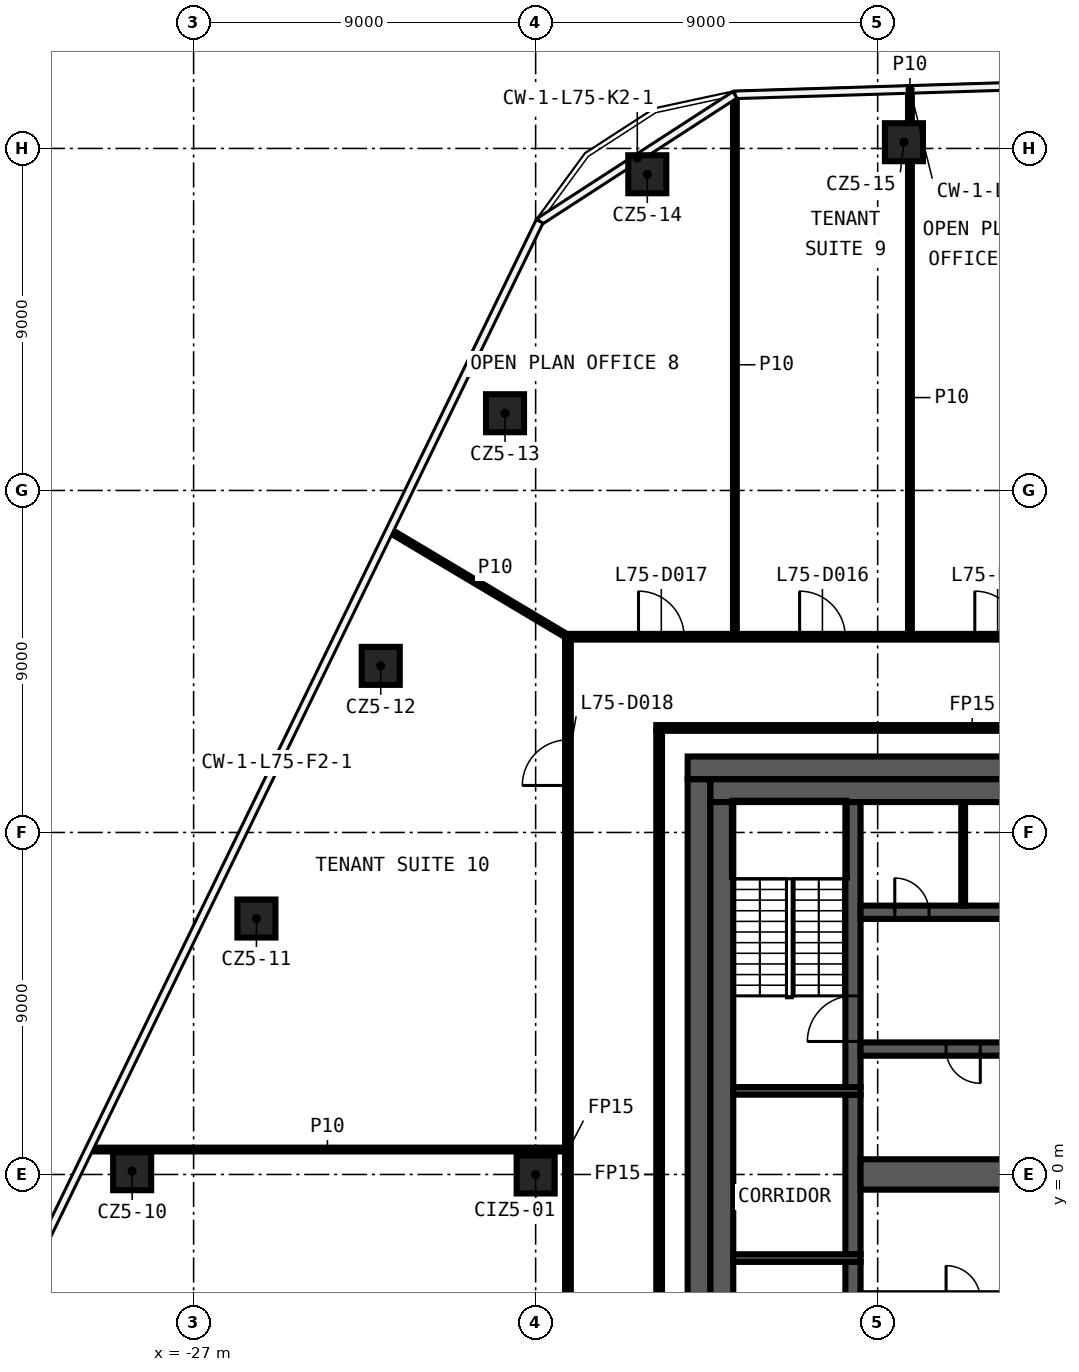
"""IFC4 building model, lengths in metres.
Left out: names, types, materials, properties, quantities, classifications, styles, units other than length and angle.
Written with IfcOpenShell. Run it as: python <this file> out.ifc"""

import sys

from ifc_helpers import new_model, si_unit, direction, frame, frame_2d, origin, origin_2d, place, context, subcontext, project, spatial, rectangle, extrude, element, fill, save


model = new_model("IFC4")
c1 = context("Model", 3, precision=1e-05, world=origin(), true_north=direction((0.0, 1.0)))
c2 = subcontext(c1, "Body", "Model", "MODEL_VIEW")
j1 = project(units=[si_unit("LENGTHUNIT", "METRE"), si_unit("PLANEANGLEUNIT", "RADIAN")], contexts=[c1])
p1 = place(None, origin())
s1 = spatial("IfcSite", under=j1, at=p1, CompositionType="ELEMENT")
p2 = place(p1, origin())
s2 = spatial("IfcBuilding", under=s1, at=p2, CompositionType="ELEMENT")
p3 = place(p2, frame((0.0, 0.0, 348.8)))
s3 = spatial("IfcBuildingStorey", under=s2, at=p3, CompositionType="ELEMENT", Elevation=348.8)
for number, where, z_axis, x_axis in (
    (1, (-28.617, 0.086, 0.0), (0.0, 0.0, 1.0), (1.0, 0.0, 0.0)),
    (2, (-25.347, 6.735, 0.0), (0.0, 0.0, 1.0), (1.0, 0.0, 0.0)),
    (3, (-22.076, 13.384, 0.0), (0.0, 0.0, 1.0), (1.0, 0.0, 0.0)),
    (4, (-18.806, 20.032, 0.0), (0.0, 0.0, 1.0), (1.0, 0.0, 0.0)),
    (5, (-15.062, 26.321, 0.0), (0.0, 0.0, 1.0), (1.0, 0.0, 0.0)),
    (6, (-8.309, 27.164, 0.0), (0.0, 0.0, 1.0), (1.0, 0.0, 0.0)),
    (7, (-18.0, 0.0, 0.0), (0.0, 0.0, 1.0), (1.0, 0.0, 0.0)),
):
    element("IfcColumn", number, at=place(p3, frame(where, z_axis=z_axis, x_axis=x_axis)), inside=s3, PredefinedType="COLUMN", context=c2, shape_type="SweptSolid", body=[
        extrude(rectangle(XDim=1.0, YDim=1.0, at=origin_2d()), origin(), (0.0, 0.0, 1.0), 3.7),
    ])
p4 = place(p3, frame((-29.732, 0.656, 0.0), z_axis=(0.0, 0.0, 1.0), x_axis=(1.0, 0.0, 0.0)))
e8 = element("IfcWall", 8, at=p4, inside=s3, PredefinedType="PARTITIONING", context=c2, shape_type="SweptSolid", body=[
    extrude(rectangle(XDim=12.507, YDim=0.1, at=frame_2d((6.253, 0.0))), origin(), (0.0, 0.0, 1.0), 3.7),
])
p5 = place(p3, frame((-14.825, 11.75, 0.0), z_axis=(0.0, 0.0, 1.0), x_axis=(1.0, 0.0, 0.0)))
e9 = element("IfcWall", 9, at=p5, inside=s3, PredefinedType="PARTITIONING", context=c2, shape_type="SweptSolid", body=[
    extrude(rectangle(XDim=16.625, YDim=0.15, at=frame_2d((8.312, 0.0))), origin(), (0.0, 0.0, 1.0), 3.7),
])
p6 = place(p3, frame((-17.225, 14.15, 0.0), z_axis=(0.0, 0.0, 1.0), x_axis=(1.0, 0.0, 0.0)))
e10 = element("IfcWall", 10, at=p6, inside=s3, PredefinedType="PARTITIONING", context=c2, shape_type="SweptSolid", body=[
    extrude(rectangle(XDim=34.45, YDim=0.15, at=frame_2d((17.225, 0.0))), origin(), (0.0, 0.0, 1.0), 3.7),
])
p7 = place(p6, frame((31.19, 0.0, 0.0)))
e11 = element("IfcOpeningElement", 11, at=p7, cuts=e10, PredefinedType="OPENING", context=c2, shape_type="SweptSolid", body=[
    extrude(rectangle(XDim=1.2, YDim=2.1, at=frame_2d((0.6, 1.05))), frame((0.0, 0.085, 0.0), z_axis=(0.0, -1.0, 0.0), x_axis=(1.0, 0.0, 0.0)), (0.0, 0.0, 1.0), 0.17),
])
p8 = place(p6, frame((24.621, 0.0, 0.0)))
e12 = element("IfcOpeningElement", 12, at=p8, cuts=e10, PredefinedType="OPENING", context=c2, shape_type="SweptSolid", body=[
    extrude(rectangle(XDim=1.2, YDim=2.1, at=frame_2d((0.6, 1.05))), frame((0.0, 0.085, 0.0), z_axis=(0.0, -1.0, 0.0), x_axis=(1.0, 0.0, 0.0)), (0.0, 0.0, 1.0), 0.17),
])
p9 = place(p6, frame((17.703, 0.0, 0.0)))
e13 = element("IfcOpeningElement", 13, at=p9, cuts=e10, PredefinedType="OPENING", context=c2, shape_type="SweptSolid", body=[
    extrude(rectangle(XDim=1.2, YDim=2.1, at=frame_2d((0.6, 1.05))), frame((0.0, 0.085, 0.0), z_axis=(0.0, -1.0, 0.0), x_axis=(1.0, 0.0, 0.0)), (0.0, 0.0, 1.0), 0.17),
])
p10 = place(p6, frame((10.781, 0.0, 0.0)))
e14 = element("IfcOpeningElement", 14, at=p10, cuts=e10, PredefinedType="OPENING", context=c2, shape_type="SweptSolid", body=[
    extrude(rectangle(XDim=1.2, YDim=2.1, at=frame_2d((0.6, 1.05))), frame((0.0, 0.085, 0.0), z_axis=(0.0, -1.0, 0.0), x_axis=(1.0, 0.0, 0.0)), (0.0, 0.0, 1.0), 0.17),
])
p11 = place(p6, frame((6.171, 0.0, 0.0)))
e15 = element("IfcOpeningElement", 15, at=p11, cuts=e10, PredefinedType="OPENING", context=c2, shape_type="SweptSolid", body=[
    extrude(rectangle(XDim=1.2, YDim=2.1, at=frame_2d((0.6, 1.05))), frame((0.0, 0.085, 0.0), z_axis=(0.0, -1.0, 0.0), x_axis=(1.0, 0.0, 0.0)), (0.0, 0.0, 1.0), 0.17),
])
p12 = place(p6, frame((1.932, 0.0, 0.0)))
e16 = element("IfcOpeningElement", 16, at=p12, cuts=e10, PredefinedType="OPENING", context=c2, shape_type="SweptSolid", body=[
    extrude(rectangle(XDim=1.2, YDim=2.1, at=frame_2d((0.6, 1.05))), frame((0.0, 0.085, 0.0), z_axis=(0.0, -1.0, 0.0), x_axis=(1.0, 0.0, 0.0)), (0.0, 0.0, 1.0), 0.17),
])
p13 = place(p3, frame((-8.151, 14.225, 0.0), z_axis=(0.0, 0.0, 1.0), x_axis=(0.0, 1.0, 0.0)))
e17 = element("IfcWall", 17, at=p13, inside=s3, PredefinedType="PARTITIONING", context=c2, shape_type="SweptSolid", body=[
    extrude(rectangle(XDim=12.439, YDim=0.1, at=frame_2d((6.219, 0.0))), origin(), (0.0, 0.0, 1.0), 3.7),
])
p14 = place(p3, frame((-8.151, 27.664, 0.0), z_axis=(0.0, 0.0, 1.0), x_axis=(0.0, 1.0, 0.0)))
e18 = element("IfcWall", 18, at=p14, inside=s3, PredefinedType="PARTITIONING", context=c2, shape_type="SweptSolid", body=[
    extrude(rectangle(XDim=0.869, YDim=0.1, at=frame_2d((0.435, 0.0))), origin(), (0.0, 0.0, 1.0), 3.7),
])
p15 = place(p3, frame((-12.757, 14.225, 0.0), z_axis=(0.0, 0.0, 1.0), x_axis=(0.0, 1.0, 0.0)))
e19 = element("IfcWall", 19, at=p15, inside=s3, PredefinedType="PARTITIONING", context=c2, shape_type="SweptSolid", body=[
    extrude(rectangle(XDim=14.165, YDim=0.1, at=frame_2d((7.083, 0.0))), origin(), (0.0, 0.0, 1.0), 3.7),
])
p16 = place(p3, frame((-14.75, -11.675, 0.0), z_axis=(0.0, 0.0, 1.0), x_axis=(0.0, 1.0, 0.0)))
e20 = element("IfcWall", 20, at=p16, inside=s3, PredefinedType="PARTITIONING", context=c2, shape_type="SweptSolid", body=[
    extrude(rectangle(XDim=23.35, YDim=0.15, at=frame_2d((11.675, 0.0))), origin(), (0.0, 0.0, 1.0), 3.7),
])
p17 = place(p3, frame((-17.15, -14.075, 0.0), z_axis=(0.0, 0.0, 1.0), x_axis=(0.0, 1.0, 0.0)))
e21 = element("IfcWall", 21, at=p17, inside=s3, PredefinedType="PARTITIONING", context=c2, shape_type="SweptSolid", body=[
    extrude(rectangle(XDim=28.15, YDim=0.15, at=frame_2d((14.075, 0.0))), origin(), (0.0, 0.0, 1.0), 3.7),
])
p18 = place(p17, frame((3.891, 0.0, 0.0)))
e22 = element("IfcOpeningElement", 22, at=p18, cuts=e21, PredefinedType="OPENING", context=c2, shape_type="SweptSolid", body=[
    extrude(rectangle(XDim=1.2, YDim=2.1, at=frame_2d((0.6, 1.05))), frame((0.0, 0.085, 0.0), z_axis=(0.0, -1.0, 0.0), x_axis=(1.0, 0.0, 0.0)), (0.0, 0.0, 1.0), 0.17),
])
p19 = place(p17, frame((24.312, 0.0, 0.0)))
e23 = element("IfcOpeningElement", 23, at=p19, cuts=e21, PredefinedType="OPENING", context=c2, shape_type="SweptSolid", body=[
    extrude(rectangle(XDim=1.2, YDim=2.1, at=frame_2d((0.6, 1.05))), frame((0.0, 0.085, 0.0), z_axis=(0.0, -1.0, 0.0), x_axis=(1.0, 0.0, 0.0)), (0.0, 0.0, 1.0), 0.17),
])
p20 = place(p3, frame((-21.828, 16.935, 0.0), z_axis=(0.0, 0.0, 1.0), x_axis=(0.859229054867, -0.51159107818, 0.0)))
e24 = element("IfcWall", 24, at=p20, inside=s3, PredefinedType="PARTITIONING", context=c2, shape_type="SweptSolid", body=[
    extrude(rectangle(XDim=5.444, YDim=0.1, at=frame_2d((2.722, 0.0))), origin(), (0.0, 0.0, 1.0), 3.7),
])
p21 = place(p3, frame((-14.0, 10.7, 0.0), z_axis=(0.0, 0.0, 1.0), x_axis=(1.0, 0.0, 0.0)))
e25 = element("IfcWall", 25, at=p21, inside=s3, PredefinedType="SHEAR", context=c2, shape_type="SweptSolid", body=[
    extrude(rectangle(XDim=28.0, YDim=0.6, at=frame_2d((14.0, 0.0))), origin(), (0.0, 0.0, 1.0), 3.7),
])
p22 = place(p21, frame((15.9, 0.0, 0.0)))
e26 = element("IfcOpeningElement", 26, at=p22, cuts=e25, PredefinedType="OPENING", context=c2, shape_type="SweptSolid", body=[
    extrude(rectangle(XDim=1.6, YDim=2.1, at=frame_2d((0.8, 1.05))), frame((0.0, 0.31, 0.0), z_axis=(0.0, -1.0, 0.0), x_axis=(1.0, 0.0, 0.0)), (0.0, 0.0, 1.0), 0.62),
])
p23 = place(p3, frame((-13.7, -10.4, 0.0), z_axis=(0.0, 0.0, 1.0), x_axis=(0.0, 1.0, 0.0)))
e27 = element("IfcWall", 27, at=p23, inside=s3, PredefinedType="SHEAR", context=c2, shape_type="SweptSolid", body=[
    extrude(rectangle(XDim=20.8, YDim=0.6, at=frame_2d((10.4, 0.0))), origin(), (0.0, 0.0, 1.0), 3.7),
])
p24 = place(p3, frame((-13.4, 10.1, 0.0), z_axis=(0.0, 0.0, 1.0), x_axis=(1.0, 0.0, 0.0)))
e28 = element("IfcWall", 28, at=p24, inside=s3, PredefinedType="SHEAR", context=c2, shape_type="SweptSolid", body=[
    extrude(rectangle(XDim=14.9, YDim=0.6, at=frame_2d((7.45, 0.0))), origin(), (0.0, 0.0, 1.0), 3.7),
])
p25 = place(p3, frame((-13.1, -9.8, 0.0), z_axis=(0.0, 0.0, 1.0), x_axis=(0.0, 1.0, 0.0)))
e29 = element("IfcWall", 29, at=p25, inside=s3, PredefinedType="SHEAR", context=c2, shape_type="SweptSolid", body=[
    extrude(rectangle(XDim=19.6, YDim=0.6, at=frame_2d((9.8, 0.0))), origin(), (0.0, 0.0, 1.0), 3.7),
])
p26 = place(p3, frame((-9.65, -9.8, 0.0), z_axis=(0.0, 0.0, 1.0), x_axis=(0.0, 1.0, 0.0)))
e30 = element("IfcWall", 30, at=p26, inside=s3, PredefinedType="SHEAR", context=c2, shape_type="SweptSolid", body=[
    extrude(rectangle(XDim=7.5, YDim=0.4, at=frame_2d((3.75, 0.0))), origin(), (0.0, 0.0, 1.0), 3.7),
])
p27 = place(p26, frame((5.1, 0.0, 0.0)))
e31 = element("IfcOpeningElement", 31, at=p27, cuts=e30, PredefinedType="OPENING", context=c2, shape_type="SweptSolid", body=[
    extrude(rectangle(XDim=1.2, YDim=2.1, at=frame_2d((0.6, 1.05))), frame((0.0, 0.21, 0.0), z_axis=(0.0, -1.0, 0.0), x_axis=(1.0, 0.0, 0.0)), (0.0, 0.0, 1.0), 0.42),
])
p28 = place(p3, frame((-9.65, -2.1, 0.0), z_axis=(0.0, 0.0, 1.0), x_axis=(0.0, 1.0, 0.0)))
e32 = element("IfcWall", 32, at=p28, inside=s3, PredefinedType="SHEAR", context=c2, shape_type="SweptSolid", body=[
    extrude(rectangle(XDim=4.2, YDim=0.4, at=frame_2d((2.1, 0.0))), origin(), (0.0, 0.0, 1.0), 3.7),
])
p29 = place(p3, frame((-9.65, 2.3, 0.0), z_axis=(0.0, 0.0, 1.0), x_axis=(0.0, 1.0, 0.0)))
e33 = element("IfcWall", 33, at=p29, inside=s3, PredefinedType="SHEAR", context=c2, shape_type="SweptSolid", body=[
    extrude(rectangle(XDim=7.5, YDim=0.4, at=frame_2d((3.75, 0.0))), origin(), (0.0, 0.0, 1.0), 3.7),
])
p30 = place(p29, frame((1.2, 0.0, 0.0)))
e34 = element("IfcOpeningElement", 34, at=p30, cuts=e33, PredefinedType="OPENING", context=c2, shape_type="SweptSolid", body=[
    extrude(rectangle(XDim=1.2, YDim=2.1, at=frame_2d((0.6, 1.05))), frame((0.0, 0.21, 0.0), z_axis=(0.0, -1.0, 0.0), x_axis=(1.0, 0.0, 0.0)), (0.0, 0.0, 1.0), 0.42),
])
for number, where, z_axis, x_axis in (
    (35, (-9.45, 2.2, 0.0), (0.0, 0.0, 1.0), (-1.0, 0.0, 0.0)),
    (36, (-9.45, -2.2, 0.0), (0.0, 0.0, 1.0), (-1.0, 0.0, 0.0)),
):
    element("IfcWall", number, at=place(p3, frame(where, z_axis=z_axis, x_axis=x_axis)), inside=s3, PredefinedType="SHEAR", context=c2, shape_type="SweptSolid", body=[
        extrude(rectangle(XDim=3.35, YDim=0.2, at=frame_2d((1.675, 0.0))), origin(), (0.0, 0.0, 1.0), 3.7),
    ])
p31 = place(p3, frame((-9.45, 6.9, 0.0), z_axis=(0.0, 0.0, 1.0), x_axis=(1.0, 0.0, 0.0)))
e37 = element("IfcWall", 37, at=p31, inside=s3, PredefinedType="SHEAR", context=c2, shape_type="SweptSolid", body=[
    extrude(rectangle(XDim=18.9, YDim=0.35, at=frame_2d((9.45, 0.0))), origin(), (0.0, 0.0, 1.0), 3.7),
])
p32 = place(p31, frame((11.55, 0.0, 0.0)))
e38 = element("IfcOpeningElement", 38, at=p32, cuts=e37, PredefinedType="OPENING", context=c2, shape_type="SweptSolid", body=[
    extrude(rectangle(XDim=1.2, YDim=2.1, at=frame_2d((0.6, 1.05))), frame((0.0, 0.185, 0.0), z_axis=(0.0, -1.0, 0.0), x_axis=(1.0, 0.0, 0.0)), (0.0, 0.0, 1.0), 0.37),
])
p33 = place(p31, frame((14.3, 0.0, 0.0)))
e39 = element("IfcOpeningElement", 39, at=p33, cuts=e37, PredefinedType="OPENING", context=c2, shape_type="SweptSolid", body=[
    extrude(rectangle(XDim=1.1, YDim=2.1, at=frame_2d((0.55, 1.05))), frame((0.0, 0.185, 0.0), z_axis=(0.0, -1.0, 0.0), x_axis=(1.0, 0.0, 0.0)), (0.0, 0.0, 1.0), 0.37),
])
p34 = place(p31, frame((17.0, 0.0, 0.0)))
e40 = element("IfcOpeningElement", 40, at=p34, cuts=e37, PredefinedType="OPENING", context=c2, shape_type="SweptSolid", body=[
    extrude(rectangle(XDim=1.1, YDim=2.1, at=frame_2d((0.55, 1.05))), frame((0.0, 0.185, 0.0), z_axis=(0.0, -1.0, 0.0), x_axis=(1.0, 0.0, 0.0)), (0.0, 0.0, 1.0), 0.37),
])
p35 = place(p31, frame((0.9, 0.0, 0.0)))
e41 = element("IfcOpeningElement", 41, at=p35, cuts=e37, PredefinedType="OPENING", context=c2, shape_type="SweptSolid", body=[
    extrude(rectangle(XDim=0.9, YDim=2.1, at=frame_2d((0.45, 1.05))), frame((0.0, 0.185, 0.0), z_axis=(0.0, -1.0, 0.0), x_axis=(1.0, 0.0, 0.0)), (0.0, 0.0, 1.0), 0.37),
])
p36 = place(p31, frame((4.95, 0.0, 0.0)))
e42 = element("IfcOpeningElement", 42, at=p36, cuts=e37, PredefinedType="OPENING", context=c2, shape_type="SweptSolid", body=[
    extrude(rectangle(XDim=0.9, YDim=2.1, at=frame_2d((0.45, 1.05))), frame((0.0, 0.185, 0.0), z_axis=(0.0, -1.0, 0.0), x_axis=(1.0, 0.0, 0.0)), (0.0, 0.0, 1.0), 0.37),
])
p37 = place(p31, frame((9.0, 0.0, 0.0)))
e43 = element("IfcOpeningElement", 43, at=p37, cuts=e37, PredefinedType="OPENING", context=c2, shape_type="SweptSolid", body=[
    extrude(rectangle(XDim=0.9, YDim=2.1, at=frame_2d((0.45, 1.05))), frame((0.0, 0.185, 0.0), z_axis=(0.0, -1.0, 0.0), x_axis=(1.0, 0.0, 0.0)), (0.0, 0.0, 1.0), 0.37),
])
p38 = place(p3, frame((9.45, 3.3, 0.0), z_axis=(0.0, 0.0, 1.0), x_axis=(-1.0, 0.0, 0.0)))
e44 = element("IfcWall", 44, at=p38, inside=s3, PredefinedType="SHEAR", context=c2, shape_type="SweptSolid", body=[
    extrude(rectangle(XDim=18.9, YDim=0.35, at=frame_2d((9.45, 0.0))), origin(), (0.0, 0.0, 1.0), 3.7),
])
p39 = place(p38, frame((6.2, 0.0, 0.0)))
e45 = element("IfcOpeningElement", 45, at=p39, cuts=e44, PredefinedType="OPENING", context=c2, shape_type="SweptSolid", body=[
    extrude(rectangle(XDim=1.1, YDim=2.1, at=frame_2d((0.55, 1.05))), frame((0.0, 0.185, 0.0), z_axis=(0.0, -1.0, 0.0), x_axis=(1.0, 0.0, 0.0)), (0.0, 0.0, 1.0), 0.37),
])
p40 = place(p38, frame((3.5, 0.0, 0.0)))
e46 = element("IfcOpeningElement", 46, at=p40, cuts=e44, PredefinedType="OPENING", context=c2, shape_type="SweptSolid", body=[
    extrude(rectangle(XDim=1.1, YDim=2.1, at=frame_2d((0.55, 1.05))), frame((0.0, 0.185, 0.0), z_axis=(0.0, -1.0, 0.0), x_axis=(1.0, 0.0, 0.0)), (0.0, 0.0, 1.0), 0.37),
])
p41 = place(p38, frame((0.9, 0.0, 0.0)))
e47 = element("IfcOpeningElement", 47, at=p41, cuts=e44, PredefinedType="OPENING", context=c2, shape_type="SweptSolid", body=[
    extrude(rectangle(XDim=0.9, YDim=2.1, at=frame_2d((0.45, 1.05))), frame((0.0, 0.185, 0.0), z_axis=(0.0, -1.0, 0.0), x_axis=(1.0, 0.0, 0.0)), (0.0, 0.0, 1.0), 0.37),
])
p42 = place(p38, frame((15.75, 0.0, 0.0)))
e48 = element("IfcOpeningElement", 48, at=p42, cuts=e44, PredefinedType="OPENING", context=c2, shape_type="SweptSolid", body=[
    extrude(rectangle(XDim=0.9, YDim=2.1, at=frame_2d((0.45, 1.05))), frame((0.0, 0.185, 0.0), z_axis=(0.0, -1.0, 0.0), x_axis=(1.0, 0.0, 0.0)), (0.0, 0.0, 1.0), 0.37),
])
p43 = place(p38, frame((10.35, 0.0, 0.0)))
e49 = element("IfcOpeningElement", 49, at=p43, cuts=e44, PredefinedType="OPENING", context=c2, shape_type="SweptSolid", body=[
    extrude(rectangle(XDim=0.9, YDim=2.1, at=frame_2d((0.45, 1.05))), frame((0.0, 0.185, 0.0), z_axis=(0.0, -1.0, 0.0), x_axis=(1.0, 0.0, 0.0)), (0.0, 0.0, 1.0), 0.37),
])
p44 = place(p3, frame((-9.45, 0.0, 0.0), z_axis=(0.0, 0.0, 1.0), x_axis=(1.0, 0.0, 0.0)))
e50 = element("IfcWall", 50, at=p44, inside=s3, PredefinedType="SHEAR", context=c2, shape_type="SweptSolid", body=[
    extrude(rectangle(XDim=18.9, YDim=0.8, at=frame_2d((9.45, 0.0))), origin(), (0.0, 0.0, 1.0), 3.7),
])
p45 = place(p3, frame((-6.75, 7.075, 0.0), z_axis=(0.0, 0.0, 1.0), x_axis=(0.0, 1.0, 0.0)))
e51 = element("IfcWall", 51, at=p45, inside=s3, PredefinedType="PARTITIONING", context=c2, shape_type="SweptSolid", body=[
    extrude(rectangle(XDim=2.725, YDim=0.1, at=frame_2d((1.363, 0.0))), origin(), (0.0, 0.0, 1.0), 3.7),
])
p46 = place(p10, origin())
e52 = element("IfcDoor", 52, at=p46, inside=s3, OperationType="SINGLE_SWING_RIGHT", PredefinedType="DOOR", context=c2, shape_type="SweptSolid", body=[
    extrude(rectangle(XDim=1.2, YDim=2.1, at=frame_2d((0.6, 1.05))), frame((0.0, 0.025, 0.0), z_axis=(0.0, -1.0, 0.0), x_axis=(1.0, 0.0, 0.0)), (0.0, 0.0, 1.0), 0.05),
])
fill(e14, e52)
p47 = place(p11, origin())
e53 = element("IfcDoor", 53, at=p47, inside=s3, OperationType="SINGLE_SWING_LEFT", PredefinedType="DOOR", context=c2, shape_type="SweptSolid", body=[
    extrude(rectangle(XDim=1.2, YDim=2.1, at=frame_2d((0.6, 1.05))), frame((0.0, 0.025, 0.0), z_axis=(0.0, -1.0, 0.0), x_axis=(1.0, 0.0, 0.0)), (0.0, 0.0, 1.0), 0.05),
])
fill(e15, e53)
p48 = place(p12, origin())
e54 = element("IfcDoor", 54, at=p48, inside=s3, OperationType="SINGLE_SWING_RIGHT", PredefinedType="DOOR", context=c2, shape_type="SweptSolid", body=[
    extrude(rectangle(XDim=1.2, YDim=2.1, at=frame_2d((0.6, 1.05))), frame((0.0, 0.025, 0.0), z_axis=(0.0, -1.0, 0.0), x_axis=(1.0, 0.0, 0.0)), (0.0, 0.0, 1.0), 0.05),
])
fill(e16, e54)
p49 = place(p19, origin())
e55 = element("IfcDoor", 55, at=p49, inside=s3, OperationType="SINGLE_SWING_LEFT", PredefinedType="DOOR", context=c2, shape_type="SweptSolid", body=[
    extrude(rectangle(XDim=1.2, YDim=2.1, at=frame_2d((0.6, 1.05))), frame((0.0, 0.025, 0.0), z_axis=(0.0, -1.0, 0.0), x_axis=(1.0, 0.0, 0.0)), (0.0, 0.0, 1.0), 0.05),
])
fill(e23, e55)
p50 = place(p35, origin())
e56 = element("IfcDoor", 56, at=p50, inside=s3, OperationType="SINGLE_SWING_RIGHT", PredefinedType="DOOR", context=c2, shape_type="SweptSolid", body=[
    extrude(rectangle(XDim=0.9, YDim=2.1, at=frame_2d((0.45, 1.05))), frame((0.0, 0.025, 0.0), z_axis=(0.0, -1.0, 0.0), x_axis=(1.0, 0.0, 0.0)), (0.0, 0.0, 1.0), 0.05),
])
fill(e41, e56)
p51 = place(p42, origin())
e57 = element("IfcDoor", 57, at=p51, inside=s3, OperationType="SINGLE_SWING_LEFT", PredefinedType="DOOR", context=c2, shape_type="SweptSolid", body=[
    extrude(rectangle(XDim=0.9, YDim=2.1, at=frame_2d((0.45, 1.05))), frame((0.0, 0.025, 0.0), z_axis=(0.0, -1.0, 0.0), x_axis=(1.0, 0.0, 0.0)), (0.0, 0.0, 1.0), 0.05),
])
fill(e48, e57)
p52 = place(p30, origin())
e58 = element("IfcDoor", 58, at=p52, inside=s3, OperationType="SINGLE_SWING_RIGHT", PredefinedType="DOOR", context=c2, shape_type="SweptSolid", body=[
    extrude(rectangle(XDim=1.2, YDim=2.1, at=frame_2d((0.6, 1.05))), frame((0.0, 0.025, 0.0), z_axis=(0.0, -1.0, 0.0), x_axis=(1.0, 0.0, 0.0)), (0.0, 0.0, 1.0), 0.05),
])
fill(e34, e58)
save(model, sys.argv[1])
